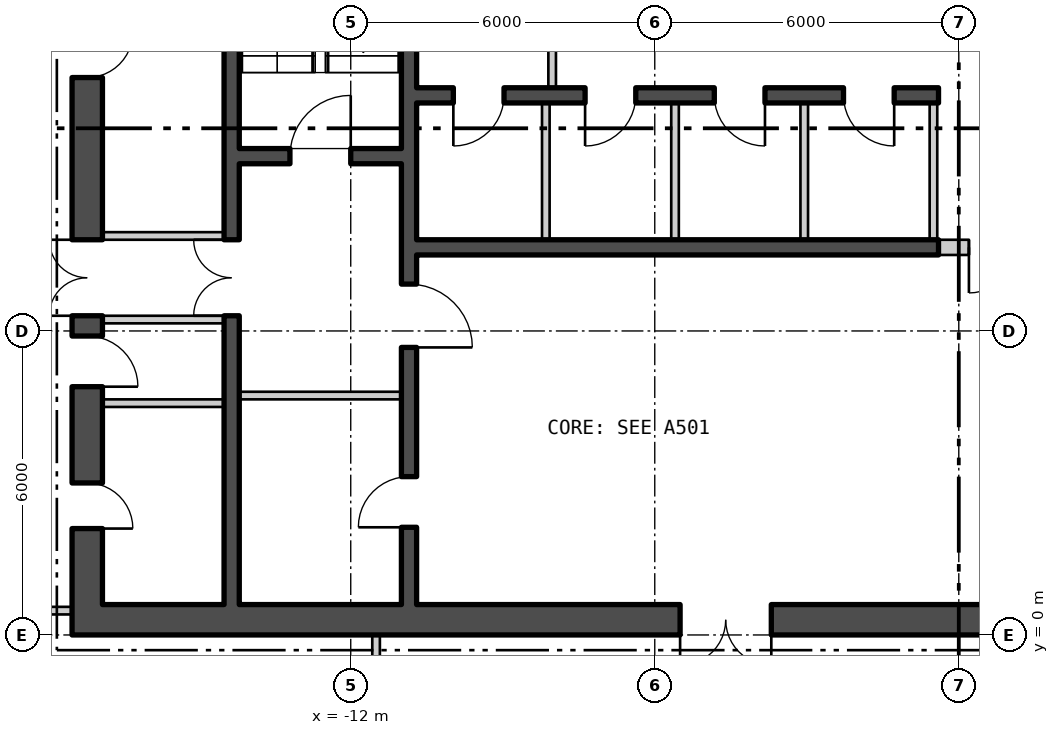
"""IFC4 building model, lengths in metres.
Left out: names, types, materials, properties, quantities, classifications, styles, units other than length and angle.
Written with IfcOpenShell. Run it as: python <this file> out.ifc"""

import sys

from ifc_helpers import new_model, si_unit, direction, frame, frame_2d, origin, place, context, subcontext, project, spatial, rectangle, extrude, element, fill, save


model = new_model("IFC4")
c1 = context("Model", 3, precision=1e-05, world=origin(), true_north=direction((0.0, 1.0)))
c2 = subcontext(c1, "Body", "Model", "MODEL_VIEW")
j1 = project(units=[si_unit("LENGTHUNIT", "METRE"), si_unit("PLANEANGLEUNIT", "RADIAN")], contexts=[c1])
p1 = place(None, origin())
s1 = spatial("IfcSite", under=j1, at=p1, CompositionType="ELEMENT")
p2 = place(p1, origin())
s2 = spatial("IfcBuilding", under=s1, at=p2, CompositionType="ELEMENT")
p3 = place(p2, frame((0.0, 0.0, -16.8)))
s3 = spatial("IfcBuildingStorey", under=s2, at=p3, CompositionType="ELEMENT", Elevation=-16.8)
p4 = place(p3, frame((-17.5, 0.3, 0.0), z_axis=(0.0, 0.0, 1.0), x_axis=(1.0, 0.0, 0.0)))
e1 = element("IfcWall", 1, at=p4, inside=s3, PredefinedType="SHEAR", context=c2, shape_type="SweptSolid", body=[
    extrude(rectangle(XDim=35.0, YDim=0.6, at=frame_2d((17.5, 0.0))), origin(), (0.0, 0.0, 1.0), 4.95),
])
p5 = place(p4, frame((12.0, 0.0, 0.0)))
e2 = element("IfcOpeningElement", 2, at=p5, cuts=e1, PredefinedType="OPENING", context=c2, shape_type="SweptSolid", body=[
    extrude(rectangle(XDim=1.8, YDim=2.4, at=frame_2d((0.9, 1.2))), frame((0.0, 0.31, 0.0), z_axis=(0.0, -1.0, 0.0), x_axis=(1.0, 0.0, 0.0)), (0.0, 0.0, 1.0), 0.62),
])
p6 = place(p4, frame((22.0, 0.0, 0.0)))
e3 = element("IfcOpeningElement", 3, at=p6, cuts=e1, PredefinedType="OPENING", context=c2, shape_type="SweptSolid", body=[
    extrude(rectangle(XDim=1.8, YDim=2.4, at=frame_2d((0.9, 1.2))), frame((0.0, 0.31, 0.0), z_axis=(0.0, -1.0, 0.0), x_axis=(1.0, 0.0, 0.0)), (0.0, 0.0, 1.0), 0.62),
])
p7 = place(p3, frame((-17.2, 0.6, 0.0), z_axis=(0.0, 0.0, 1.0), x_axis=(0.0, 1.0, 0.0)))
e4 = element("IfcWall", 4, at=p7, inside=s3, PredefinedType="SHEAR", context=c2, shape_type="SweptSolid", body=[
    extrude(rectangle(XDim=16.8, YDim=0.6, at=frame_2d((8.4, 0.0))), origin(), (0.0, 0.0, 1.0), 4.95),
])
p8 = place(p7, frame((5.7, 0.0, 0.0)))
e5 = element("IfcOpeningElement", 5, at=p8, cuts=e4, PredefinedType="OPENING", context=c2, shape_type="SweptSolid", body=[
    extrude(rectangle(XDim=1.5, YDim=2.1, at=frame_2d((0.75, 1.05))), frame((0.0, 0.31, 0.0), z_axis=(0.0, -1.0, 0.0), x_axis=(1.0, 0.0, 0.0)), (0.0, 0.0, 1.0), 0.62),
])
p9 = place(p7, frame((1.5, 0.0, 0.0)))
e6 = element("IfcOpeningElement", 6, at=p9, cuts=e4, PredefinedType="OPENING", context=c2, shape_type="SweptSolid", body=[
    extrude(rectangle(XDim=0.9, YDim=2.1, at=frame_2d((0.45, 1.05))), frame((0.0, 0.31, 0.0), z_axis=(0.0, -1.0, 0.0), x_axis=(1.0, 0.0, 0.0)), (0.0, 0.0, 1.0), 0.62),
])
p10 = place(p7, frame((4.3, 0.0, 0.0)))
e7 = element("IfcOpeningElement", 7, at=p10, cuts=e4, PredefinedType="OPENING", context=c2, shape_type="SweptSolid", body=[
    extrude(rectangle(XDim=1.0, YDim=2.1, at=frame_2d((0.5, 1.05))), frame((0.0, 0.31, 0.0), z_axis=(0.0, -1.0, 0.0), x_axis=(1.0, 0.0, 0.0)), (0.0, 0.0, 1.0), 0.62),
])
p11 = place(p7, frame((10.402, 0.0, 0.0)))
e8 = element("IfcOpeningElement", 8, at=p11, cuts=e4, PredefinedType="OPENING", context=c2, shape_type="SweptSolid", body=[
    extrude(rectangle(XDim=0.9, YDim=2.1, at=frame_2d((0.45, 1.05))), frame((0.0, 0.31, 0.0), z_axis=(0.0, -1.0, 0.0), x_axis=(1.0, 0.0, 0.0)), (0.0, 0.0, 1.0), 0.62),
])
p12 = place(p7, frame((15.202, 0.0, 0.0)))
e9 = element("IfcOpeningElement", 9, at=p12, cuts=e4, PredefinedType="OPENING", context=c2, shape_type="SweptSolid", body=[
    extrude(rectangle(XDim=0.9, YDim=2.1, at=frame_2d((0.45, 1.05))), frame((0.0, 0.31, 0.0), z_axis=(0.0, -1.0, 0.0), x_axis=(1.0, 0.0, 0.0)), (0.0, 0.0, 1.0), 0.62),
])
p13 = place(p3, frame((-10.85, 0.6, 0.0), z_axis=(0.0, 0.0, 1.0), x_axis=(0.0, 1.0, 0.0)))
e10 = element("IfcWall", 10, at=p13, inside=s3, PredefinedType="SHEAR", context=c2, shape_type="SweptSolid", body=[
    extrude(rectangle(XDim=16.8, YDim=0.3, at=frame_2d((8.4, 0.0))), origin(), (0.0, 0.0, 1.0), 4.95),
])
p14 = place(p13, frame((5.075, 0.0, 0.0)))
e11 = element("IfcOpeningElement", 11, at=p14, cuts=e10, PredefinedType="OPENING", context=c2, shape_type="SweptSolid", body=[
    extrude(rectangle(XDim=1.25, YDim=2.1, at=frame_2d((0.625, 1.05))), frame((0.0, 0.16, 0.0), z_axis=(0.0, -1.0, 0.0), x_axis=(1.0, 0.0, 0.0)), (0.0, 0.0, 1.0), 0.32),
])
p15 = place(p13, frame((1.525, 0.0, 0.0)))
e12 = element("IfcOpeningElement", 12, at=p15, cuts=e10, PredefinedType="OPENING", context=c2, shape_type="SweptSolid", body=[
    extrude(rectangle(XDim=1.0, YDim=2.1, at=frame_2d((0.5, 1.05))), frame((0.0, 0.16, 0.0), z_axis=(0.0, -1.0, 0.0), x_axis=(1.0, 0.0, 0.0)), (0.0, 0.0, 1.0), 0.32),
])
p16 = place(p3, frame((-14.35, 0.6, 0.0), z_axis=(0.0, 0.0, 1.0), x_axis=(0.0, 1.0, 0.0)))
e13 = element("IfcWall", 13, at=p16, inside=s3, PredefinedType="SHEAR", context=c2, shape_type="SweptSolid", body=[
    extrude(rectangle(XDim=16.8, YDim=0.3, at=frame_2d((8.4, 0.0))), origin(), (0.0, 0.0, 1.0), 4.95),
])
p17 = place(p16, frame((5.7, 0.0, 0.0)))
e14 = element("IfcOpeningElement", 14, at=p17, cuts=e13, PredefinedType="OPENING", context=c2, shape_type="SweptSolid", body=[
    extrude(rectangle(XDim=1.5, YDim=2.1, at=frame_2d((0.75, 1.05))), frame((0.0, 0.16, 0.0), z_axis=(0.0, -1.0, 0.0), x_axis=(1.0, 0.0, 0.0)), (0.0, 0.0, 1.0), 0.32),
])
p18 = place(p3, frame((-14.2, 9.45, 0.0), z_axis=(0.0, 0.0, 1.0), x_axis=(1.0, 0.0, 0.0)))
e15 = element("IfcWall", 15, at=p18, inside=s3, PredefinedType="SHEAR", context=c2, shape_type="SweptSolid", body=[
    extrude(rectangle(XDim=3.2, YDim=0.3, at=frame_2d((1.6, 0.0))), origin(), (0.0, 0.0, 1.0), 4.95),
])
p19 = place(p18, frame((1.0, 0.0, 0.0)))
e16 = element("IfcOpeningElement", 16, at=p19, cuts=e15, PredefinedType="OPENING", context=c2, shape_type="SweptSolid", body=[
    extrude(rectangle(XDim=1.2, YDim=2.1, at=frame_2d((0.6, 1.05))), frame((0.0, 0.16, 0.0), z_axis=(0.0, -1.0, 0.0), x_axis=(1.0, 0.0, 0.0)), (0.0, 0.0, 1.0), 0.32),
])
p20 = place(p3, frame((-10.7, 10.65, 0.0), z_axis=(0.0, 0.0, 1.0), x_axis=(1.0, 0.0, 0.0)))
e17 = element("IfcWall", 17, at=p20, inside=s3, PredefinedType="SHEAR", context=c2, shape_type="SweptSolid", body=[
    extrude(rectangle(XDim=10.3, YDim=0.3, at=frame_2d((5.15, 0.0))), origin(), (0.0, 0.0, 1.0), 4.95),
])
p21 = place(p20, frame((0.725, 0.0, 0.0)))
e18 = element("IfcOpeningElement", 18, at=p21, cuts=e17, PredefinedType="OPENING", context=c2, shape_type="SweptSolid", body=[
    extrude(rectangle(XDim=1.0, YDim=2.1, at=frame_2d((0.5, 1.05))), frame((0.0, 0.16, 0.0), z_axis=(0.0, -1.0, 0.0), x_axis=(1.0, 0.0, 0.0)), (0.0, 0.0, 1.0), 0.32),
])
p22 = place(p20, frame((3.325, 0.0, 0.0)))
e19 = element("IfcOpeningElement", 19, at=p22, cuts=e17, PredefinedType="OPENING", context=c2, shape_type="SweptSolid", body=[
    extrude(rectangle(XDim=1.0, YDim=2.1, at=frame_2d((0.5, 1.05))), frame((0.0, 0.16, 0.0), z_axis=(0.0, -1.0, 0.0), x_axis=(1.0, 0.0, 0.0)), (0.0, 0.0, 1.0), 0.32),
])
p23 = place(p20, frame((5.875, 0.0, 0.0)))
e20 = element("IfcOpeningElement", 20, at=p23, cuts=e17, PredefinedType="OPENING", context=c2, shape_type="SweptSolid", body=[
    extrude(rectangle(XDim=1.0, YDim=2.1, at=frame_2d((0.5, 1.05))), frame((0.0, 0.16, 0.0), z_axis=(0.0, -1.0, 0.0), x_axis=(1.0, 0.0, 0.0)), (0.0, 0.0, 1.0), 0.32),
])
p24 = place(p20, frame((8.425, 0.0, 0.0)))
e21 = element("IfcOpeningElement", 21, at=p24, cuts=e17, PredefinedType="OPENING", context=c2, shape_type="SweptSolid", body=[
    extrude(rectangle(XDim=1.0, YDim=2.1, at=frame_2d((0.5, 1.05))), frame((0.0, 0.16, 0.0), z_axis=(0.0, -1.0, 0.0), x_axis=(1.0, 0.0, 0.0)), (0.0, 0.0, 1.0), 0.32),
])
p25 = place(p3, frame((-10.7, 7.65, 0.0), z_axis=(0.0, 0.0, 1.0), x_axis=(1.0, 0.0, 0.0)))
e22 = element("IfcWall", 22, at=p25, inside=s3, PredefinedType="SHEAR", context=c2, shape_type="SweptSolid", body=[
    extrude(rectangle(XDim=10.3, YDim=0.3, at=frame_2d((5.15, 0.0))), origin(), (0.0, 0.0, 1.0), 4.95),
])
for number, where, z_axis, x_axis in (
    (23, (-8.15, 7.8, 0.0), (0.0, 0.0, 1.0), (0.0, 1.0, 0.0)),
    (24, (-5.6, 7.8, 0.0), (0.0, 0.0, 1.0), (0.0, 1.0, 0.0)),
    (25, (-3.05, 7.8, 0.0), (0.0, 0.0, 1.0), (0.0, 1.0, 0.0)),
    (26, (-0.5, 7.8, 0.0), (0.0, 0.0, 1.0), (0.0, 1.0, 0.0)),
):
    element("IfcWall", number, at=place(p3, frame(where, z_axis=z_axis, x_axis=x_axis)), inside=s3, PredefinedType="PARTITIONING", context=c2, shape_type="SweptSolid", body=[
        extrude(rectangle(XDim=2.7, YDim=0.15, at=frame_2d((1.35, 0.0))), origin(), (0.0, 0.0, 1.0), 4.95),
    ])
p26 = place(p3, frame((-8.025, 10.8, 0.0), z_axis=(0.0, 0.0, 1.0), x_axis=(0.0, 1.0, 0.0)))
e27 = element("IfcWall", 27, at=p26, inside=s3, PredefinedType="PARTITIONING", context=c2, shape_type="SweptSolid", body=[
    extrude(rectangle(XDim=3.6, YDim=0.15, at=frame_2d((1.8, 0.0))), origin(), (0.0, 0.0, 1.0), 4.95),
])
p27 = place(p26, frame((1.175, 0.0, 0.0)))
e28 = element("IfcOpeningElement", 28, at=p27, cuts=e27, PredefinedType="OPENING", context=c2, shape_type="SweptSolid", body=[
    extrude(rectangle(XDim=1.25, YDim=2.1, at=frame_2d((0.625, 1.05))), frame((0.0, 0.085, 0.0), z_axis=(0.0, -1.0, 0.0), x_axis=(1.0, 0.0, 0.0)), (0.0, 0.0, 1.0), 0.17),
])
p28 = place(p3, frame((-14.2, 4.725, 0.0), z_axis=(0.0, 0.0, 1.0), x_axis=(1.0, 0.0, 0.0)))
e29 = element("IfcWall", 29, at=p28, inside=s3, PredefinedType="PARTITIONING", context=c2, shape_type="SweptSolid", body=[
    extrude(rectangle(XDim=3.2, YDim=0.15, at=frame_2d((1.6, 0.0))), origin(), (0.0, 0.0, 1.0), 4.95),
])
for number, where, z_axis, x_axis in (
    (30, (-16.9, 6.225, 0.0), (0.0, 0.0, 1.0), (1.0, 0.0, 0.0)),
    (31, (-16.9, 7.875, 0.0), (0.0, 0.0, 1.0), (1.0, 0.0, 0.0)),
    (32, (-16.9, 4.575, 0.0), (0.0, 0.0, 1.0), (1.0, 0.0, 0.0)),
):
    element("IfcWall", number, at=place(p3, frame(where, z_axis=z_axis, x_axis=x_axis)), inside=s3, PredefinedType="PARTITIONING", context=c2, shape_type="SweptSolid", body=[
        extrude(rectangle(XDim=2.4, YDim=0.15, at=frame_2d((1.2, 0.0))), origin(), (0.0, 0.0, 1.0), 4.95),
    ])
p29 = place(p3, frame((-0.4, 7.65, 0.0), z_axis=(0.0, 0.0, 1.0), x_axis=(1.0, 0.0, 0.0)))
e33 = element("IfcWall", 33, at=p29, inside=s3, PredefinedType="PARTITIONING", context=c2, shape_type="SweptSolid", body=[
    extrude(rectangle(XDim=3.0, YDim=0.3, at=frame_2d((1.5, 0.0))), origin(), (0.0, 0.0, 1.0), 4.95),
])
p30 = place(p29, frame((0.6, 0.0, 0.0)))
e34 = element("IfcOpeningElement", 34, at=p30, cuts=e33, PredefinedType="OPENING", context=c2, shape_type="SweptSolid", body=[
    extrude(rectangle(XDim=1.8, YDim=2.4, at=frame_2d((0.9, 1.2))), frame((0.0, 0.16, 0.0), z_axis=(0.0, -1.0, 0.0), x_axis=(1.0, 0.0, 0.0)), (0.0, 0.0, 1.0), 0.32),
])
p31 = place(p3, frame((-19.9, 0.48, 0.0), z_axis=(0.0, 0.0, 1.0), x_axis=(1.0, 0.0, 0.0)))
e35 = element("IfcWall", 35, at=p31, inside=s3, PredefinedType="PARTITIONING", context=c2, shape_type="SweptSolid", body=[
    extrude(rectangle(XDim=2.4, YDim=0.15, at=frame_2d((1.2, 0.0))), origin(), (0.0, 0.0, 1.0), 4.95),
])
p32 = place(p31, frame((0.7, 0.0, 0.0)))
e36 = element("IfcOpeningElement", 36, at=p32, cuts=e35, PredefinedType="OPENING", context=c2, shape_type="SweptSolid", body=[
    extrude(rectangle(XDim=1.0, YDim=2.1, at=frame_2d((0.5, 1.05))), frame((0.0, 0.085, 0.0), z_axis=(0.0, -1.0, 0.0), x_axis=(1.0, 0.0, 0.0)), (0.0, 0.0, 1.0), 0.17),
])
p33 = place(p3, frame((-11.5, -6.075, 0.0), z_axis=(0.0, 0.0, 1.0), x_axis=(0.0, 1.0, 0.0)))
e37 = element("IfcWall", 37, at=p33, inside=s3, PredefinedType="PARTITIONING", context=c2, shape_type="SweptSolid", body=[
    extrude(rectangle(XDim=6.075, YDim=0.15, at=frame_2d((3.038, 0.0))), origin(), (0.0, 0.0, 1.0), 4.95),
])
p34 = place(p33, frame((4.375, 0.0, 0.0)))
e38 = element("IfcOpeningElement", 38, at=p34, cuts=e37, PredefinedType="OPENING", context=c2, shape_type="SweptSolid", body=[
    extrude(rectangle(XDim=1.0, YDim=2.1, at=frame_2d((0.5, 1.05))), frame((0.0, 0.085, 0.0), z_axis=(0.0, -1.0, 0.0), x_axis=(1.0, 0.0, 0.0)), (0.0, 0.0, 1.0), 0.17),
])
p35 = place(p21, origin())
e39 = element("IfcDoor", 39, at=p35, inside=s3, OperationType="SINGLE_SWING_LEFT", PredefinedType="DOOR", context=c2, shape_type="SweptSolid", body=[
    extrude(rectangle(XDim=1.0, YDim=2.1, at=frame_2d((0.5, 1.05))), frame((0.0, 0.025, 0.0), z_axis=(0.0, -1.0, 0.0), x_axis=(1.0, 0.0, 0.0)), (0.0, 0.0, 1.0), 0.05),
])
fill(e18, e39)
p36 = place(p22, origin())
e40 = element("IfcDoor", 40, at=p36, inside=s3, OperationType="SINGLE_SWING_LEFT", PredefinedType="DOOR", context=c2, shape_type="SweptSolid", body=[
    extrude(rectangle(XDim=1.0, YDim=2.1, at=frame_2d((0.5, 1.05))), frame((0.0, 0.025, 0.0), z_axis=(0.0, -1.0, 0.0), x_axis=(1.0, 0.0, 0.0)), (0.0, 0.0, 1.0), 0.05),
])
fill(e19, e40)
p37 = place(p23, origin())
e41 = element("IfcDoor", 41, at=p37, inside=s3, OperationType="SINGLE_SWING_RIGHT", PredefinedType="DOOR", context=c2, shape_type="SweptSolid", body=[
    extrude(rectangle(XDim=1.0, YDim=2.1, at=frame_2d((0.5, 1.05))), frame((0.0, 0.025, 0.0), z_axis=(0.0, -1.0, 0.0), x_axis=(1.0, 0.0, 0.0)), (0.0, 0.0, 1.0), 0.05),
])
fill(e20, e41)
p38 = place(p24, origin())
e42 = element("IfcDoor", 42, at=p38, inside=s3, OperationType="SINGLE_SWING_RIGHT", PredefinedType="DOOR", context=c2, shape_type="SweptSolid", body=[
    extrude(rectangle(XDim=1.0, YDim=2.1, at=frame_2d((0.5, 1.05))), frame((0.0, 0.025, 0.0), z_axis=(0.0, -1.0, 0.0), x_axis=(1.0, 0.0, 0.0)), (0.0, 0.0, 1.0), 0.05),
])
fill(e21, e42)
p39 = place(p19, origin())
e43 = element("IfcDoor", 43, at=p39, inside=s3, OperationType="SINGLE_SWING_LEFT", PredefinedType="DOOR", context=c2, shape_type="SweptSolid", body=[
    extrude(rectangle(XDim=1.2, YDim=2.1, at=frame_2d((0.6, 1.05))), frame((0.0, 0.025, 0.0), z_axis=(0.0, -1.0, 0.0), x_axis=(1.0, 0.0, 0.0)), (0.0, 0.0, 1.0), 0.05),
])
fill(e16, e43)
p40 = place(p14, origin())
e44 = element("IfcDoor", 44, at=p40, inside=s3, OperationType="SINGLE_SWING_LEFT", PredefinedType="DOOR", context=c2, shape_type="SweptSolid", body=[
    extrude(rectangle(XDim=1.25, YDim=2.1, at=frame_2d((0.625, 1.05))), frame((0.0, 0.025, 0.0), z_axis=(0.0, -1.0, 0.0), x_axis=(1.0, 0.0, 0.0)), (0.0, 0.0, 1.0), 0.05),
])
fill(e11, e44)
p41 = place(p15, origin())
e45 = element("IfcDoor", 45, at=p41, inside=s3, OperationType="SINGLE_SWING_RIGHT", PredefinedType="DOOR", context=c2, shape_type="SweptSolid", body=[
    extrude(rectangle(XDim=1.0, YDim=2.1, at=frame_2d((0.5, 1.05))), frame((0.0, 0.025, 0.0), z_axis=(0.0, -1.0, 0.0), x_axis=(1.0, 0.0, 0.0)), (0.0, 0.0, 1.0), 0.05),
])
fill(e12, e45)
p42 = place(p17, origin())
e46 = element("IfcDoor", 46, at=p42, inside=s3, OperationType="DOUBLE_DOOR_SINGLE_SWING", PredefinedType="DOOR", context=c2, shape_type="SweptSolid", body=[
    extrude(rectangle(XDim=1.5, YDim=2.1, at=frame_2d((0.75, 1.05))), frame((0.0, 0.025, 0.0), z_axis=(0.0, -1.0, 0.0), x_axis=(1.0, 0.0, 0.0)), (0.0, 0.0, 1.0), 0.05),
])
fill(e14, e46)
p43 = place(p8, origin())
e47 = element("IfcDoor", 47, at=p43, inside=s3, OperationType="DOUBLE_DOOR_SINGLE_SWING", PredefinedType="DOOR", context=c2, shape_type="SweptSolid", body=[
    extrude(rectangle(XDim=1.5, YDim=2.1, at=frame_2d((0.75, 1.05))), frame((0.0, 0.025, 0.0), z_axis=(0.0, -1.0, 0.0), x_axis=(1.0, 0.0, 0.0)), (0.0, 0.0, 1.0), 0.05),
])
fill(e5, e47)
p44 = place(p9, origin())
e48 = element("IfcDoor", 48, at=p44, inside=s3, OperationType="SINGLE_SWING_LEFT", PredefinedType="DOOR", context=c2, shape_type="SweptSolid", body=[
    extrude(rectangle(XDim=0.9, YDim=2.1, at=frame_2d((0.45, 1.05))), frame((0.0, 0.025, 0.0), z_axis=(0.0, -1.0, 0.0), x_axis=(1.0, 0.0, 0.0)), (0.0, 0.0, 1.0), 0.05),
])
fill(e6, e48)
p45 = place(p10, origin())
e49 = element("IfcDoor", 49, at=p45, inside=s3, OperationType="SINGLE_SWING_LEFT", PredefinedType="DOOR", context=c2, shape_type="SweptSolid", body=[
    extrude(rectangle(XDim=1.0, YDim=2.1, at=frame_2d((0.5, 1.05))), frame((0.0, 0.025, 0.0), z_axis=(0.0, -1.0, 0.0), x_axis=(1.0, 0.0, 0.0)), (0.0, 0.0, 1.0), 0.05),
])
fill(e7, e49)
p46 = place(p11, origin())
e50 = element("IfcDoor", 50, at=p46, inside=s3, OperationType="SINGLE_SWING_RIGHT", PredefinedType="DOOR", context=c2, shape_type="SweptSolid", body=[
    extrude(rectangle(XDim=0.9, YDim=2.1, at=frame_2d((0.45, 1.05))), frame((0.0, 0.025, 0.0), z_axis=(0.0, -1.0, 0.0), x_axis=(1.0, 0.0, 0.0)), (0.0, 0.0, 1.0), 0.05),
])
fill(e8, e50)
p47 = place(p30, origin())
e51 = element("IfcDoor", 51, at=p47, inside=s3, OperationType="DOUBLE_DOOR_SINGLE_SWING", PredefinedType="DOOR", context=c2, shape_type="SweptSolid", body=[
    extrude(rectangle(XDim=1.8, YDim=2.4, at=frame_2d((0.9, 1.2))), frame((0.0, 0.025, 0.0), z_axis=(0.0, -1.0, 0.0), x_axis=(1.0, 0.0, 0.0)), (0.0, 0.0, 1.0), 0.05),
])
fill(e34, e51)
p48 = place(p5, origin())
e52 = element("IfcDoor", 52, at=p48, inside=s3, OperationType="DOUBLE_DOOR_SINGLE_SWING", PredefinedType="DOOR", context=c2, shape_type="SweptSolid", body=[
    extrude(rectangle(XDim=1.8, YDim=2.4, at=frame_2d((0.9, 1.2))), frame((0.0, 0.025, 0.0), z_axis=(0.0, -1.0, 0.0), x_axis=(1.0, 0.0, 0.0)), (0.0, 0.0, 1.0), 0.05),
])
fill(e2, e52)
save(model, sys.argv[1])
